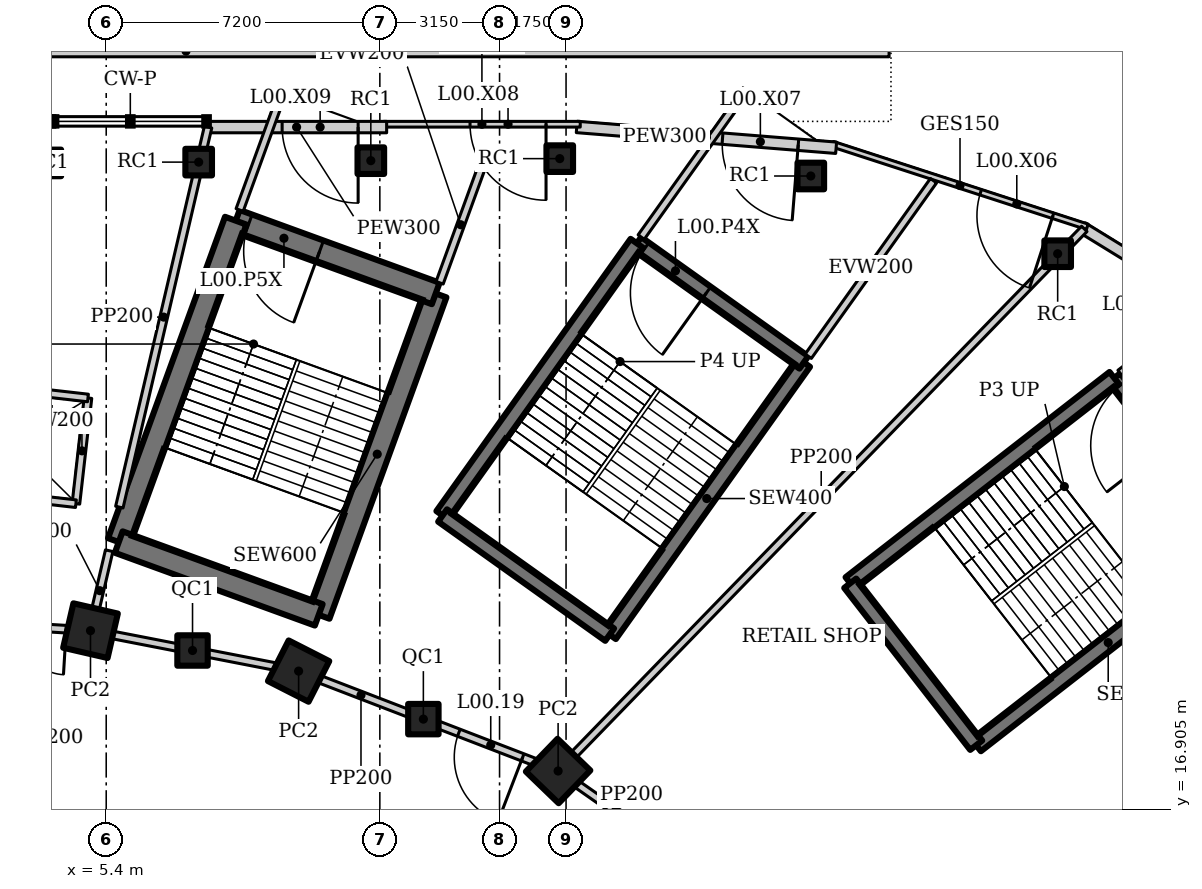
"""IFC4 building model, lengths in metres.
Left out: names, types, materials, properties, quantities, classifications, styles, units other than length and angle.
Written with IfcOpenShell. Run it as: python <this file> out.ifc"""

import sys

from ifc_helpers import new_model, si_unit, direction, frame, frame_2d, origin, origin_2d, place, context, subcontext, project, spatial, rectangle, hollow_rectangle, extrude, element, fill, save


model = new_model("IFC4")
c1 = context("Model", 3, precision=1e-05, world=origin(), true_north=direction((0.0, 1.0)))
c2 = subcontext(c1, "Body", "Model", "MODEL_VIEW")
j1 = project(units=[si_unit("LENGTHUNIT", "METRE"), si_unit("PLANEANGLEUNIT", "RADIAN")], contexts=[c1])
p1 = place(None, origin())
s1 = spatial("IfcSite", under=j1, at=p1, CompositionType="ELEMENT")
p2 = place(p1, origin())
s2 = spatial("IfcBuilding", under=s1, at=p2, CompositionType="ELEMENT")
p3 = place(p2, origin())
s3 = spatial("IfcBuildingStorey", under=s2, at=p3, CompositionType="ELEMENT", Elevation=0.0)
for number, where, z_axis, x_axis in (
    (1, (17.291, 17.905, 0.0), (0.0, 0.0, 1.0), (0.695, 0.719, 0.0)),
    (2, (10.463, 20.534, 0.0), (0.0, 0.0, 1.0), (0.454, 0.891, 0.0)),
    (3, (4.986, 21.598, 0.0), (0.0, 0.0, 1.0), (0.225, 0.974, 0.0)),
):
    element("IfcColumn", number, at=place(p3, frame(where, z_axis=z_axis, x_axis=x_axis)), inside=s3, PredefinedType="COLUMN", context=c2, shape_type="SweptSolid", body=[
        extrude(hollow_rectangle(XDim=1.2, YDim=1.2, WallThickness=0.1, at=origin_2d()), origin(), (0.0, 0.0, 1.0), 6.5),
    ])
for number, where, z_axis, x_axis in (
    (4, (13.745, 19.27, 0.0), (0.0, 0.0, 1.0), (1.0, 0.0, 0.0)),
    (5, (7.671, 21.076, 0.0), (0.0, 0.0, 1.0), (1.0, 0.0, 0.0)),
):
    element("IfcColumn", number, at=place(p3, frame(where, z_axis=z_axis, x_axis=x_axis)), inside=s3, PredefinedType="COLUMN", context=c2, shape_type="SweptSolid", body=[
        extrude(hollow_rectangle(XDim=0.8, YDim=0.8, WallThickness=0.05, at=origin_2d()), origin(), (0.0, 0.0, 1.0), 6.5),
    ])
for number, where, z_axis, x_axis in (
    (6, (23.94, 33.563, 0.0), (0.0, 0.0, 1.0), (1.0, 0.0, 0.0)),
    (7, (12.363, 33.966, 0.0), (0.0, 0.0, 1.0), (1.0, 0.0, 0.0)),
    (8, (3.863, 33.907, 0.0), (0.0, 0.0, 1.0), (1.0, 0.0, 0.0)),
    (9, (30.436, 31.518, 0.0), (0.0, 0.0, 1.0), (1.0, 0.0, 0.0)),
    (10, (17.334, 34.02, 0.0), (0.0, 0.0, 1.0), (1.0, 0.0, 0.0)),
    (11, (7.833, 33.928, 0.0), (0.0, 0.0, 1.0), (1.0, 0.0, 0.0)),
):
    element("IfcColumn", number, at=place(p3, frame(where, z_axis=z_axis, x_axis=x_axis)), inside=s3, PredefinedType="COLUMN", context=c2, shape_type="SweptSolid", body=[
        extrude(hollow_rectangle(XDim=0.7, YDim=0.7, WallThickness=0.04, at=origin_2d()), origin(), (0.0, 0.0, 1.0), 6.5),
    ])
p4 = place(p3, frame((36.932, 28.608, 0.0), z_axis=(0.0, 0.0, 1.0), x_axis=(-0.851808565246, 0.52385319334, 0.0)))
e12 = element("IfcWall", 12, at=p4, inside=s3, PredefinedType="SOLIDWALL", context=c2, shape_type="SweptSolid", body=[
    extrude(rectangle(XDim=6.861, YDim=0.3, at=frame_2d((3.43, 0.0))), origin(), (0.0, 0.0, 1.0), 6.3),
])
p5 = place(p4, frame((0.45, 0.0, 0.0)))
e13 = element("IfcOpeningElement", 13, at=p5, cuts=e12, PredefinedType="OPENING", context=c2, shape_type="SweptSolid", body=[
    extrude(rectangle(XDim=2.0, YDim=2.1, at=frame_2d((1.0, 1.05))), frame((0.0, 0.16, 0.0), z_axis=(0.0, -1.0, 0.0), x_axis=(1.0, 0.0, 0.0)), (0.0, 0.0, 1.0), 0.32),
])
p6 = place(p3, frame((31.215, 32.225, 0.0), z_axis=(0.0, 0.0, 1.0), x_axis=(-0.951133133407, 0.308781091609, 0.0)))
e14 = element("IfcWall", 14, at=p6, inside=s3, PredefinedType="ELEMENTEDWALL", context=c2, shape_type="SweptSolid", body=[
    extrude(rectangle(XDim=7.042, YDim=0.15, at=frame_2d((3.521, 0.0))), origin(), (0.0, 0.0, 1.0), 6.3),
])
p7 = place(p6, frame((0.95, 0.0, 0.0)))
e15 = element("IfcOpeningElement", 15, at=p7, cuts=e14, PredefinedType="OPENING", context=c2, shape_type="SweptSolid", body=[
    extrude(rectangle(XDim=2.0, YDim=2.4, at=frame_2d((1.0, 1.2))), frame((0.0, 0.085, 0.0), z_axis=(0.0, -1.0, 0.0), x_axis=(1.0, 0.0, 0.0)), (0.0, 0.0, 1.0), 0.17),
])
p8 = place(p3, frame((24.607, 34.306, 0.0), z_axis=(0.0, 0.0, 1.0), x_axis=(-0.996791084449, 0.080047073422, 0.0)))
e16 = element("IfcWall", 16, at=p8, inside=s3, PredefinedType="SOLIDWALL", context=c2, shape_type="SweptSolid", body=[
    extrude(rectangle(XDim=6.847, YDim=0.3, at=frame_2d((3.424, 0.0))), origin(), (0.0, 0.0, 1.0), 6.3),
])
p9 = place(p8, frame((1.0, 0.0, 0.0)))
e17 = element("IfcOpeningElement", 17, at=p9, cuts=e16, PredefinedType="OPENING", context=c2, shape_type="SweptSolid", body=[
    extrude(rectangle(XDim=2.0, YDim=2.1, at=frame_2d((1.0, 1.05))), frame((0.0, 0.16, 0.0), z_axis=(0.0, -1.0, 0.0), x_axis=(1.0, 0.0, 0.0)), (0.0, 0.0, 1.0), 0.32),
])
p10 = place(p3, frame((17.873, 34.925, 0.0), z_axis=(0.0, 0.0, 1.0), x_axis=(-1.0, 0.0, 0.0)))
e18 = element("IfcWall", 18, at=p10, inside=s3, PredefinedType="ELEMENTEDWALL", context=c2, shape_type="SweptSolid", body=[
    extrude(rectangle(XDim=5.174, YDim=0.15, at=frame_2d((2.587, 0.0))), origin(), (0.0, 0.0, 1.0), 6.3),
])
p11 = place(p10, frame((0.9, 0.0, 0.0)))
e19 = element("IfcOpeningElement", 19, at=p11, cuts=e18, PredefinedType="OPENING", context=c2, shape_type="SweptSolid", body=[
    extrude(rectangle(XDim=2.0, YDim=2.4, at=frame_2d((1.0, 1.2))), frame((0.0, 0.085, 0.0), z_axis=(0.0, -1.0, 0.0), x_axis=(1.0, 0.0, 0.0)), (0.0, 0.0, 1.0), 0.17),
])
p12 = place(p3, frame((12.779, 34.85, 0.0), z_axis=(0.0, 0.0, 1.0), x_axis=(-1.0, 0.0, 0.0)))
e20 = element("IfcWall", 20, at=p12, inside=s3, PredefinedType="SOLIDWALL", context=c2, shape_type="SweptSolid", body=[
    extrude(rectangle(XDim=4.739, YDim=0.3, at=frame_2d((2.369, 0.0))), origin(), (0.0, 0.0, 1.0), 6.3),
])
p13 = place(p12, frame((0.75, 0.0, 0.0)))
e21 = element("IfcOpeningElement", 21, at=p13, cuts=e20, PredefinedType="OPENING", context=c2, shape_type="SweptSolid", body=[
    extrude(rectangle(XDim=2.0, YDim=2.1, at=frame_2d((1.0, 1.05))), frame((0.0, 0.16, 0.0), z_axis=(0.0, -1.0, 0.0), x_axis=(1.0, 0.0, 0.0)), (0.0, 0.0, 1.0), 0.32),
])
p14 = place(p3, frame((-11.0, 36.85, 0.0), z_axis=(0.0, 0.0, 1.0), x_axis=(1.0, 0.0, 0.0)))
e22 = element("IfcWall", 22, at=p14, inside=s3, PredefinedType="SOLIDWALL", context=c2, shape_type="SweptSolid", body=[
    extrude(rectangle(XDim=37.0, YDim=0.3, at=frame_2d((18.5, 0.0))), origin(), (0.0, 0.0, 1.0), 1.1),
])
p15 = place(p3, frame((32.082, 28.371, 0.0), z_axis=(0.0, 0.0, 1.0), x_axis=(0.789376118937, 0.613909881702, 0.0)))
e23 = element("IfcWall", 23, at=p15, inside=s3, PredefinedType="SOLIDWALL", context=c2, shape_type="SweptSolid", body=[
    extrude(rectangle(XDim=3.85, YDim=0.2, at=frame_2d((1.925, 0.0))), origin(), (0.0, 0.0, 1.0), 6.3),
])
p16 = place(p3, frame((23.874, 28.82, 0.0), z_axis=(0.0, 0.0, 1.0), x_axis=(0.580713086154, 0.814108292287, 0.0)))
e24 = element("IfcWall", 24, at=p16, inside=s3, PredefinedType="SOLIDWALL", context=c2, shape_type="SweptSolid", body=[
    extrude(rectangle(XDim=5.675, YDim=0.2, at=frame_2d((2.837, 0.0))), origin(), (0.0, 0.0, 1.0), 6.3),
])
p17 = place(p3, frame((19.477, 31.956, 0.0), z_axis=(0.0, 0.0, 1.0), x_axis=(0.580683804281, 0.814129178599, 0.0)))
e25 = element("IfcWall", 25, at=p17, inside=s3, PredefinedType="SOLIDWALL", context=c2, shape_type="SweptSolid", body=[
    extrude(rectangle(XDim=4.75, YDim=0.2, at=frame_2d((2.375, 0.0))), origin(), (0.0, 0.0, 1.0), 6.3),
])
for number, where, z_axis, x_axis in (
    (26, (14.173, 30.753, 0.0), (0.0, 0.0, 1.0), (0.342, 0.94, 0.0)),
    (27, (8.911, 32.669, 0.0), (0.0, 0.0, 1.0), (0.342, 0.94, 0.0)),
):
    element("IfcWall", number, at=place(p3, frame(where, z_axis=z_axis, x_axis=x_axis)), inside=s3, PredefinedType="SOLIDWALL", context=c2, shape_type="SweptSolid", body=[
        extrude(rectangle(XDim=3.25, YDim=0.2, at=frame_2d((1.625, 0.0))), origin(), (0.0, 0.0, 1.0), 6.3),
    ])
p18 = place(p3, frame((20.309, 15.794, 0.0), z_axis=(0.0, 0.0, 1.0), x_axis=(-0.819409395821, 0.573208724672, 0.0)))
e28 = element("IfcWall", 28, at=p18, inside=s3, PredefinedType="SOLIDWALL", context=c2, shape_type="SweptSolid", body=[
    extrude(rectangle(XDim=3.683, YDim=0.2, at=frame_2d((1.841, 0.0))), origin(), (0.0, 0.0, 1.0), 5.896),
])
p19 = place(p3, frame((17.291, 17.905, 0.0), z_axis=(0.0, 0.0, 1.0), x_axis=(-0.933224646415, 0.359293416754, 0.0)))
e29 = element("IfcWall", 29, at=p19, inside=s3, PredefinedType="SOLIDWALL", context=c2, shape_type="SweptSolid", body=[
    extrude(rectangle(XDim=3.799, YDim=0.2, at=frame_2d((1.899, 0.0))), origin(), (0.0, 0.0, 1.0), 5.7),
])
p20 = place(p19, frame((1.0, 0.0, 0.0)))
e30 = element("IfcOpeningElement", 30, at=p20, cuts=e29, PredefinedType="OPENING", context=c2, shape_type="SweptSolid", body=[
    extrude(rectangle(XDim=1.8, YDim=2.4, at=frame_2d((0.9, 1.2))), frame((0.0, 0.11, 0.0), z_axis=(0.0, -1.0, 0.0), x_axis=(1.0, 0.0, 0.0)), (0.0, 0.0, 1.0), 0.22),
])
p21 = place(p3, frame((13.745, 19.27, 0.0), z_axis=(0.0, 0.0, 1.0), x_axis=(-0.933241815012, 0.359248820058, 0.0)))
e31 = element("IfcWall", 31, at=p21, inside=s3, PredefinedType="SOLIDWALL", context=c2, shape_type="SweptSolid", body=[
    extrude(rectangle(XDim=3.518, YDim=0.2, at=frame_2d((1.759, 0.0))), origin(), (0.0, 0.0, 1.0), 5.7),
])
p22 = place(p3, frame((10.463, 20.534, 0.0), z_axis=(0.0, 0.0, 1.0), x_axis=(-0.98163593748, 0.190763954266, 0.0)))
e32 = element("IfcWall", 32, at=p22, inside=s3, PredefinedType="SOLIDWALL", context=c2, shape_type="SweptSolid", body=[
    extrude(rectangle(XDim=2.844, YDim=0.2, at=frame_2d((1.422, 0.0))), origin(), (0.0, 0.0, 1.0), 5.896),
])
p23 = place(p3, frame((7.671, 21.076, 0.0), z_axis=(0.0, 0.0, 1.0), x_axis=(-0.981637218105, 0.190757364289, 0.0)))
e33 = element("IfcWall", 33, at=p23, inside=s3, PredefinedType="SOLIDWALL", context=c2, shape_type="SweptSolid", body=[
    extrude(rectangle(XDim=2.735, YDim=0.2, at=frame_2d((1.368, 0.0))), origin(), (0.0, 0.0, 1.0), 5.896),
])
p24 = place(p3, frame((4.986, 21.598, 0.0), z_axis=(0.0, 0.0, 1.0), x_axis=(-0.998172405641, 0.060430527186, 0.0)))
e34 = element("IfcWall", 34, at=p24, inside=s3, PredefinedType="SOLIDWALL", context=c2, shape_type="SweptSolid", body=[
    extrude(rectangle(XDim=2.513, YDim=0.2, at=frame_2d((1.256, 0.0))), origin(), (0.0, 0.0, 1.0), 5.896),
])
p25 = place(p24, frame((0.64, 0.0, 0.0)))
e35 = element("IfcOpeningElement", 35, at=p25, cuts=e34, PredefinedType="OPENING", context=c2, shape_type="SweptSolid", body=[
    extrude(rectangle(XDim=1.2, YDim=2.4, at=frame_2d((0.6, 1.2))), frame((0.0, 0.11, 0.0), z_axis=(0.0, -1.0, 0.0), x_axis=(1.0, 0.0, 0.0)), (0.0, 0.0, 1.0), 0.22),
])
p26 = place(p3, frame((17.291, 17.905, 0.0), z_axis=(0.0, 0.0, 1.0), x_axis=(0.696460684513, 0.717594951855, 0.0)))
e36 = element("IfcWall", 36, at=p26, inside=s3, PredefinedType="SOLIDWALL", context=c2, shape_type="SweptSolid", body=[
    extrude(rectangle(XDim=19.881, YDim=0.2, at=frame_2d((9.94, 0.0))), origin(), (0.0, 0.0, 1.0), 4.8),
])
p27 = place(p3, frame((4.986, 21.598, 0.0), z_axis=(0.0, 0.0, 1.0), x_axis=(0.227351065365, 0.973812863479, 0.0)))
e37 = element("IfcWall", 37, at=p27, inside=s3, PredefinedType="SOLIDWALL", context=c2, shape_type="SweptSolid", body=[
    extrude(rectangle(XDim=2.161, YDim=0.2, at=frame_2d((1.08, 0.0))), origin(), (0.0, 0.0, 1.0), 4.8),
])
p28 = place(p3, frame((5.745, 24.849, 0.0), z_axis=(0.0, 0.0, 1.0), x_axis=(0.227353607936, 0.973812269875, 0.0)))
e38 = element("IfcWall", 38, at=p28, inside=s3, PredefinedType="SOLIDWALL", context=c2, shape_type="SweptSolid", body=[
    extrude(rectangle(XDim=10.27, YDim=0.2, at=frame_2d((5.135, 0.0))), origin(), (0.0, 0.0, 1.0), 4.8),
])
p29 = place(p3, frame((28.293, 18.583, 0.0), z_axis=(0.0, 0.0, 1.0), x_axis=(0.78938060008, 0.613904119726, 0.0)))
e39 = element("IfcWall", 39, at=p29, inside=s3, PredefinedType="SHEAR", context=c2, shape_type="SweptSolid", body=[
    extrude(rectangle(XDim=8.8, YDim=0.4, at=frame_2d((4.4, 0.0))), origin(), (0.0, 0.0, 1.0), 6.5),
])
p30 = place(p3, frame((35.239, 23.985, 0.0), z_axis=(0.0, 0.0, 1.0), x_axis=(-0.613912443548, 0.789374126544, 0.0)))
e40 = element("IfcWall", 40, at=p30, inside=s3, PredefinedType="SHEAR", context=c2, shape_type="SweptSolid", body=[
    extrude(rectangle(XDim=5.4, YDim=0.4, at=frame_2d((2.7, 0.0))), origin(), (0.0, 0.0, 1.0), 6.5),
])
p31 = place(p30, frame((3.15, 0.0, 0.0)))
e41 = element("IfcOpeningElement", 41, at=p31, cuts=e40, PredefinedType="OPENING", context=c2, shape_type="SweptSolid", body=[
    extrude(rectangle(XDim=2.0, YDim=2.1, at=frame_2d((1.0, 1.05))), frame((0.0, 0.21, 0.0), z_axis=(0.0, -1.0, 0.0), x_axis=(1.0, 0.0, 0.0)), (0.0, 0.0, 1.0), 0.42),
])
p32 = place(p3, frame((31.924, 28.248, 0.0), z_axis=(0.0, 0.0, 1.0), x_axis=(-0.78938060008, -0.613904119726, 0.0)))
e42 = element("IfcWall", 42, at=p32, inside=s3, PredefinedType="SHEAR", context=c2, shape_type="SweptSolid", body=[
    extrude(rectangle(XDim=8.8, YDim=0.4, at=frame_2d((4.4, 0.0))), origin(), (0.0, 0.0, 1.0), 6.5),
])
p33 = place(p3, frame((24.978, 22.846, 0.0), z_axis=(0.0, 0.0, 1.0), x_axis=(0.613912443548, -0.789374126544, 0.0)))
e43 = element("IfcWall", 43, at=p33, inside=s3, PredefinedType="SHEAR", context=c2, shape_type="SweptSolid", body=[
    extrude(rectangle(XDim=5.4, YDim=0.4, at=frame_2d((2.7, 0.0))), origin(), (0.0, 0.0, 1.0), 6.5),
])
p34 = place(p3, frame((18.647, 21.493, 0.0), z_axis=(0.0, 0.0, 1.0), x_axis=(0.580705313356, 0.814113836659, 0.0)))
e44 = element("IfcWall", 44, at=p34, inside=s3, PredefinedType="SHEAR", context=c2, shape_type="SweptSolid", body=[
    extrude(rectangle(XDim=8.8, YDim=0.4, at=frame_2d((4.4, 0.0))), origin(), (0.0, 0.0, 1.0), 6.5),
])
p35 = place(p3, frame((23.757, 28.657, 0.0), z_axis=(0.0, 0.0, 1.0), x_axis=(-0.814121252423, 0.580694916762, 0.0)))
e45 = element("IfcWall", 45, at=p35, inside=s3, PredefinedType="SHEAR", context=c2, shape_type="SweptSolid", body=[
    extrude(rectangle(XDim=5.4, YDim=0.4, at=frame_2d((2.7, 0.0))), origin(), (0.0, 0.0, 1.0), 6.5),
])
p36 = place(p35, frame((3.15, 0.0, 0.0)))
e46 = element("IfcOpeningElement", 46, at=p36, cuts=e45, PredefinedType="OPENING", context=c2, shape_type="SweptSolid", body=[
    extrude(rectangle(XDim=2.0, YDim=2.1, at=frame_2d((1.0, 1.05))), frame((0.0, 0.21, 0.0), z_axis=(0.0, -1.0, 0.0), x_axis=(1.0, 0.0, 0.0)), (0.0, 0.0, 1.0), 0.42),
])
p37 = place(p3, frame((19.361, 31.793, 0.0), z_axis=(0.0, 0.0, 1.0), x_axis=(-0.580705313356, -0.814113836659, 0.0)))
e47 = element("IfcWall", 47, at=p37, inside=s3, PredefinedType="SHEAR", context=c2, shape_type="SweptSolid", body=[
    extrude(rectangle(XDim=8.8, YDim=0.4, at=frame_2d((4.4, 0.0))), origin(), (0.0, 0.0, 1.0), 6.5),
])
p38 = place(p3, frame((14.251, 24.629, 0.0), z_axis=(0.0, 0.0, 1.0), x_axis=(0.814121252423, -0.580694916762, 0.0)))
e48 = element("IfcWall", 48, at=p38, inside=s3, PredefinedType="SHEAR", context=c2, shape_type="SweptSolid", body=[
    extrude(rectangle(XDim=5.4, YDim=0.4, at=frame_2d((2.7, 0.0))), origin(), (0.0, 0.0, 1.0), 6.5),
])
p39 = place(p3, frame((10.992, 22.014, 0.0), z_axis=(0.0, 0.0, 1.0), x_axis=(0.342013127703, 0.939695174234, 0.0)))
e49 = element("IfcWall", 49, at=p39, inside=s3, PredefinedType="SHEAR", context=c2, shape_type="SweptSolid", body=[
    extrude(rectangle(XDim=9.0, YDim=0.6, at=frame_2d((4.5, 0.0))), origin(), (0.0, 0.0, 1.0), 6.5),
])
p40 = place(p3, frame((14.07, 30.471, 0.0), z_axis=(0.0, 0.0, 1.0), x_axis=(-0.939692822968, 0.342019587834, 0.0)))
e50 = element("IfcWall", 50, at=p40, inside=s3, PredefinedType="SHEAR", context=c2, shape_type="SweptSolid", body=[
    extrude(rectangle(XDim=5.6, YDim=0.6, at=frame_2d((2.8, 0.0))), origin(), (0.0, 0.0, 1.0), 6.5),
])
p41 = place(p40, frame((3.25, 0.0, 0.0)))
e51 = element("IfcOpeningElement", 51, at=p41, cuts=e50, PredefinedType="OPENING", context=c2, shape_type="SweptSolid", body=[
    extrude(rectangle(XDim=2.0, YDim=2.1, at=frame_2d((1.0, 1.05))), frame((0.0, 0.31, 0.0), z_axis=(0.0, -1.0, 0.0), x_axis=(1.0, 0.0, 0.0)), (0.0, 0.0, 1.0), 0.62),
])
p42 = place(p3, frame((8.808, 32.387, 0.0), z_axis=(0.0, 0.0, 1.0), x_axis=(-0.3420218461, -0.939692001025, 0.0)))
e52 = element("IfcWall", 52, at=p42, inside=s3, PredefinedType="SHEAR", context=c2, shape_type="SweptSolid", body=[
    extrude(rectangle(XDim=9.0, YDim=0.6, at=frame_2d((4.5, 0.0))), origin(), (0.0, 0.0, 1.0), 6.5),
])
p43 = place(p3, frame((5.73, 23.93, 0.0), z_axis=(0.0, 0.0, 1.0), x_axis=(0.939678810556, -0.342058084236, 0.0)))
e53 = element("IfcWall", 53, at=p43, inside=s3, PredefinedType="SHEAR", context=c2, shape_type="SweptSolid", body=[
    extrude(rectangle(XDim=5.6, YDim=0.6, at=frame_2d((2.8, 0.0))), origin(), (0.0, 0.0, 1.0), 6.5),
])
p44 = place(p3, frame((4.603, 24.939, 0.0), z_axis=(0.0, 0.0, 1.0), x_axis=(0.113177712989, 0.993574760792, 0.0)))
e54 = element("IfcWall", 54, at=p44, inside=s3, PredefinedType="SOLIDWALL", context=c2, shape_type="SweptSolid", body=[
    extrude(rectangle(XDim=2.8, YDim=0.2, at=frame_2d((1.4, 0.0))), origin(), (0.0, 0.0, 1.0), 6.3),
])
p45 = place(p3, frame((4.92, 27.721, 0.0), z_axis=(0.0, 0.0, 1.0), x_axis=(-0.993571061716, 0.113210182053, 0.0)))
e55 = element("IfcWall", 55, at=p45, inside=s3, PredefinedType="SOLIDWALL", context=c2, shape_type="SweptSolid", body=[
    extrude(rectangle(XDim=3.5, YDim=0.2, at=frame_2d((1.75, 0.0))), origin(), (0.0, 0.0, 1.0), 4.8),
])
p46 = place(p3, frame((1.125, 25.335, 0.0), z_axis=(0.0, 0.0, 1.0), x_axis=(0.993571061716, -0.113210182053, 0.0)))
e56 = element("IfcWall", 56, at=p46, inside=s3, PredefinedType="SOLIDWALL", context=c2, shape_type="SweptSolid", body=[
    extrude(rectangle(XDim=3.5, YDim=0.2, at=frame_2d((1.75, 0.0))), origin(), (0.0, 0.0, 1.0), 4.8),
])
p47 = place(p46, frame((1.2, 0.0, 0.0)))
e57 = element("IfcOpeningElement", 57, at=p47, cuts=e56, PredefinedType="OPENING", context=c2, shape_type="SweptSolid", body=[
    extrude(rectangle(XDim=1.1, YDim=2.2, at=frame_2d((0.55, 1.1))), frame((0.0, 0.11, 0.0), z_axis=(0.0, -1.0, 0.0), x_axis=(1.0, 0.0, 0.0)), (0.0, 0.0, 1.0), 0.22),
])
p48 = place(p7, origin())
e58 = element("IfcDoor", 58, at=p48, inside=s3, OperationType="DOUBLE_DOOR_DOUBLE_SWING", PredefinedType="DOOR", context=c2, shape_type="SweptSolid", body=[
    extrude(rectangle(XDim=2.0, YDim=2.4, at=frame_2d((1.0, 1.2))), frame((0.0, 0.025, 0.0), z_axis=(0.0, -1.0, 0.0), x_axis=(1.0, 0.0, 0.0)), (0.0, 0.0, 1.0), 0.05),
])
fill(e15, e58)
p49 = place(p9, origin())
e59 = element("IfcDoor", 59, at=p49, inside=s3, OperationType="DOUBLE_DOOR_DOUBLE_SWING", PredefinedType="DOOR", context=c2, shape_type="SweptSolid", body=[
    extrude(rectangle(XDim=2.0, YDim=2.1, at=frame_2d((1.0, 1.05))), frame((0.0, 0.025, 0.0), z_axis=(0.0, -1.0, 0.0), x_axis=(1.0, 0.0, 0.0)), (0.0, 0.0, 1.0), 0.05),
])
fill(e17, e59)
p50 = place(p11, origin())
e60 = element("IfcDoor", 60, at=p50, inside=s3, OperationType="DOUBLE_DOOR_DOUBLE_SWING", PredefinedType="DOOR", context=c2, shape_type="SweptSolid", body=[
    extrude(rectangle(XDim=2.0, YDim=2.4, at=frame_2d((1.0, 1.2))), frame((0.0, 0.025, 0.0), z_axis=(0.0, -1.0, 0.0), x_axis=(1.0, 0.0, 0.0)), (0.0, 0.0, 1.0), 0.05),
])
fill(e19, e60)
p51 = place(p13, origin())
e61 = element("IfcDoor", 61, at=p51, inside=s3, OperationType="DOUBLE_DOOR_DOUBLE_SWING", PredefinedType="DOOR", context=c2, shape_type="SweptSolid", body=[
    extrude(rectangle(XDim=2.0, YDim=2.1, at=frame_2d((1.0, 1.05))), frame((0.0, 0.025, 0.0), z_axis=(0.0, -1.0, 0.0), x_axis=(1.0, 0.0, 0.0)), (0.0, 0.0, 1.0), 0.05),
])
fill(e21, e61)
p52 = place(p20, origin())
e62 = element("IfcDoor", 62, at=p52, inside=s3, OperationType="DOUBLE_DOOR_DOUBLE_SWING", PredefinedType="DOOR", context=c2, shape_type="SweptSolid", body=[
    extrude(rectangle(XDim=1.8, YDim=2.4, at=frame_2d((0.9, 1.2))), frame((0.0, 0.025, 0.0), z_axis=(0.0, -1.0, 0.0), x_axis=(1.0, 0.0, 0.0)), (0.0, 0.0, 1.0), 0.05),
])
fill(e30, e62)
p53 = place(p25, origin())
e63 = element("IfcDoor", 63, at=p53, inside=s3, OperationType="SINGLE_SWING_RIGHT", PredefinedType="DOOR", context=c2, shape_type="SweptSolid", body=[
    extrude(rectangle(XDim=1.2, YDim=2.4, at=frame_2d((0.6, 1.2))), frame((0.0, 0.025, 0.0), z_axis=(0.0, -1.0, 0.0), x_axis=(1.0, 0.0, 0.0)), (0.0, 0.0, 1.0), 0.05),
])
fill(e35, e63)
p54 = place(p31, origin())
e64 = element("IfcDoor", 64, at=p54, inside=s3, OperationType="DOUBLE_DOOR_DOUBLE_SWING", PredefinedType="DOOR", context=c2, shape_type="SweptSolid", body=[
    extrude(rectangle(XDim=2.0, YDim=2.1, at=frame_2d((1.0, 1.05))), frame((0.0, 0.025, 0.0), z_axis=(0.0, -1.0, 0.0), x_axis=(1.0, 0.0, 0.0)), (0.0, 0.0, 1.0), 0.05),
])
fill(e41, e64)
p55 = place(p36, origin())
e65 = element("IfcDoor", 65, at=p55, inside=s3, OperationType="DOUBLE_DOOR_DOUBLE_SWING", PredefinedType="DOOR", context=c2, shape_type="SweptSolid", body=[
    extrude(rectangle(XDim=2.0, YDim=2.1, at=frame_2d((1.0, 1.05))), frame((0.0, 0.025, 0.0), z_axis=(0.0, -1.0, 0.0), x_axis=(1.0, 0.0, 0.0)), (0.0, 0.0, 1.0), 0.05),
])
fill(e46, e65)
p56 = place(p41, origin())
e66 = element("IfcDoor", 66, at=p56, inside=s3, OperationType="DOUBLE_DOOR_DOUBLE_SWING", PredefinedType="DOOR", context=c2, shape_type="SweptSolid", body=[
    extrude(rectangle(XDim=2.0, YDim=2.1, at=frame_2d((1.0, 1.05))), frame((0.0, 0.025, 0.0), z_axis=(0.0, -1.0, 0.0), x_axis=(1.0, 0.0, 0.0)), (0.0, 0.0, 1.0), 0.05),
])
fill(e51, e66)
save(model, sys.argv[1])
